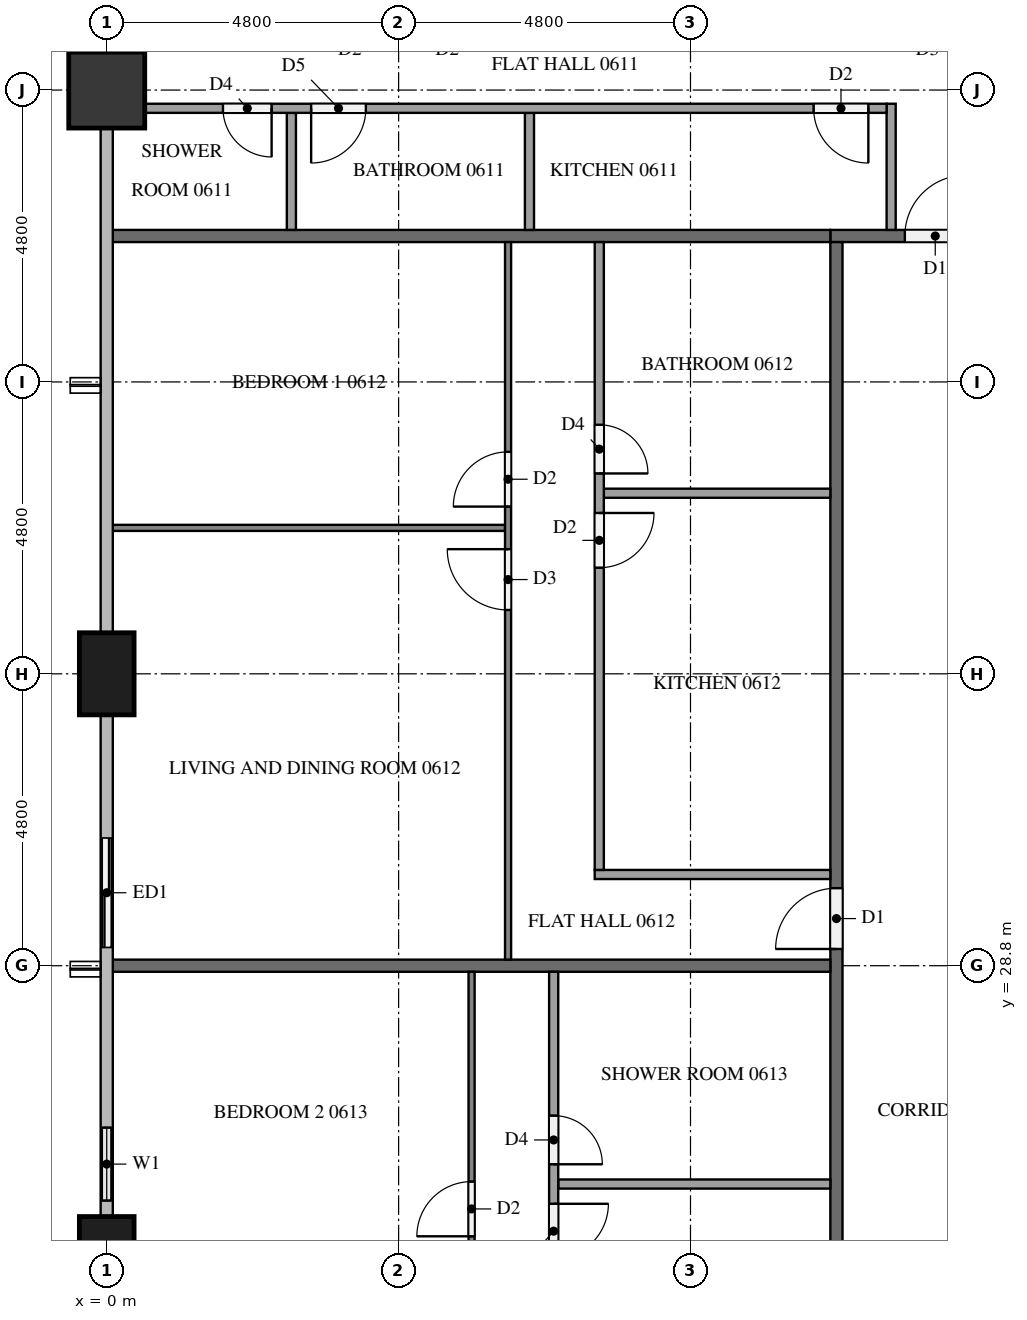
"""IFC4 building model, lengths in metres.
Left out: names, types, materials, properties, quantities, classifications, styles, units other than length and angle.
Written with IfcOpenShell. Run it as: python <this file> out.ifc"""

import sys

from ifc_helpers import new_model, si_unit, direction, frame, frame_2d, origin, origin_2d, place, context, subcontext, project, spatial, rectangle, extrude, element, fill, save


model = new_model("IFC4")
c1 = context("Model", 3, precision=1e-05, world=origin(), true_north=direction((0.0, 1.0)))
c2 = subcontext(c1, "Body", "Model", "MODEL_VIEW")
j1 = project(units=[si_unit("LENGTHUNIT", "METRE"), si_unit("PLANEANGLEUNIT", "RADIAN")], contexts=[c1])
p1 = place(None, origin())
s1 = spatial("IfcSite", under=j1, at=p1, CompositionType="ELEMENT")
p2 = place(p1, origin())
s2 = spatial("IfcBuilding", under=s1, at=p2, CompositionType="ELEMENT")
p3 = place(p2, frame((0.0, 0.0, 29.4)))
s3 = spatial("IfcBuildingStorey", under=s2, at=p3, CompositionType="ELEMENT", Elevation=29.4)
p4 = place(p3, frame((0.0, 43.2, 0.0), z_axis=(0.0, 0.0, 1.0), x_axis=(1.0, 0.0, 0.0)))
e1 = element("IfcColumn", 1, at=p4, inside=s3, PredefinedType="COLUMN", context=c2, shape_type="SweptSolid", body=[
    extrude(rectangle(XDim=1.25, YDim=1.25, at=origin_2d()), origin(), (0.0, 0.0, 1.0), 3.2),
])
for number, where, z_axis, x_axis in (
    (2, (0.0, 33.6, 0.0), (0.0, 0.0, 1.0), (0.0, 1.0, 0.0)),
    (3, (0.0, 24.0, 0.0), (0.0, 0.0, 1.0), (0.0, 1.0, 0.0)),
):
    element("IfcColumn", number, at=place(p3, frame(where, z_axis=z_axis, x_axis=x_axis)), inside=s3, PredefinedType="COLUMN", context=c2, shape_type="SweptSolid", body=[
        extrude(rectangle(XDim=1.35, YDim=0.9, at=origin_2d()), origin(), (0.0, 0.0, 1.0), 3.2),
    ])
p5 = place(p3, frame((0.0, 31.2, 0.0), z_axis=(0.0, 0.0, 1.0), x_axis=(0.0, -1.0, 0.0)))
e4 = element("IfcWall", 4, at=p5, inside=s3, PredefinedType="SOLIDWALL", context=c2, shape_type="SweptSolid", body=[
    extrude(rectangle(XDim=2.4, YDim=0.15, at=frame_2d((1.2, 0.0))), origin(), (0.0, 0.0, 1.0), 3.2),
])
p6 = place(p5, frame((0.3, 0.0, 0.0)))
e5 = element("IfcOpeningElement", 5, at=p6, cuts=e4, PredefinedType="OPENING", context=c2, shape_type="SweptSolid", body=[
    extrude(rectangle(XDim=1.8, YDim=2.4, at=frame_2d((0.9, 1.2))), frame((0.0, 0.085, 0.0), z_axis=(0.0, -1.0, 0.0), x_axis=(1.0, 0.0, 0.0)), (0.0, 0.0, 1.0), 0.17),
])
p7 = place(p3, frame((0.0, 26.4, 0.0), z_axis=(0.0, 0.0, 1.0), x_axis=(0.0, -1.0, 0.0)))
e6 = element("IfcWall", 6, at=p7, inside=s3, PredefinedType="SOLIDWALL", context=c2, shape_type="SweptSolid", body=[
    extrude(rectangle(XDim=1.725, YDim=0.15, at=frame_2d((0.862, 0.0))), origin(), (0.0, 0.0, 1.0), 3.2),
])
p8 = place(p7, frame((0.262, 0.0, 0.9)))
e7 = element("IfcOpeningElement", 7, at=p8, cuts=e6, PredefinedType="OPENING", context=c2, shape_type="SweptSolid", body=[
    extrude(rectangle(XDim=1.2, YDim=1.4, at=frame_2d((0.6, 0.7))), frame((0.0, 0.085, 0.0), z_axis=(0.0, -1.0, 0.0), x_axis=(1.0, 0.0, 0.0)), (0.0, 0.0, 1.0), 0.17),
])
p9 = place(p3, frame((11.9, 40.8, 0.0), z_axis=(0.0, 0.0, 1.0), x_axis=(1.0, 0.0, 0.0)))
e8 = element("IfcWall", 8, at=p9, inside=s3, PredefinedType="PARTITIONING", context=c2, shape_type="SweptSolid", body=[
    extrude(rectangle(XDim=38.6, YDim=0.2, at=frame_2d((19.3, 0.0))), origin(), (0.0, 0.0, 1.0), 3.2),
])
p10 = place(p9, frame((37.225, 0.0, 0.0)))
e9 = element("IfcOpeningElement", 9, at=p10, cuts=e8, PredefinedType="OPENING", context=c2, shape_type="SweptSolid", body=[
    extrude(rectangle(XDim=1.0, YDim=2.1, at=frame_2d((0.5, 1.05))), frame((0.0, 0.11, 0.0), z_axis=(0.0, -1.0, 0.0), x_axis=(1.0, 0.0, 0.0)), (0.0, 0.0, 1.0), 0.22),
])
p11 = place(p9, frame((30.025, 0.0, 0.0)))
e10 = element("IfcOpeningElement", 10, at=p11, cuts=e8, PredefinedType="OPENING", context=c2, shape_type="SweptSolid", body=[
    extrude(rectangle(XDim=1.0, YDim=2.1, at=frame_2d((0.5, 1.05))), frame((0.0, 0.11, 0.0), z_axis=(0.0, -1.0, 0.0), x_axis=(1.0, 0.0, 0.0)), (0.0, 0.0, 1.0), 0.22),
])
p12 = place(p9, frame((2.725, 0.0, 0.0)))
e11 = element("IfcOpeningElement", 11, at=p12, cuts=e8, PredefinedType="OPENING", context=c2, shape_type="SweptSolid", body=[
    extrude(rectangle(XDim=1.1, YDim=2.1, at=frame_2d((0.55, 1.05))), frame((0.0, 0.11, 0.0), z_axis=(0.0, -1.0, 0.0), x_axis=(1.0, 0.0, 0.0)), (0.0, 0.0, 1.0), 0.22),
])
p13 = place(p9, frame((1.225, 0.0, 0.0)))
e12 = element("IfcOpeningElement", 12, at=p13, cuts=e8, PredefinedType="OPENING", context=c2, shape_type="SweptSolid", body=[
    extrude(rectangle(XDim=1.0, YDim=2.1, at=frame_2d((0.5, 1.05))), frame((0.0, 0.11, 0.0), z_axis=(0.0, -1.0, 0.0), x_axis=(1.0, 0.0, 0.0)), (0.0, 0.0, 1.0), 0.22),
])
p14 = place(p3, frame((12.0, 12.1, 0.0), z_axis=(0.0, 0.0, 1.0), x_axis=(0.0, 1.0, 0.0)))
e13 = element("IfcWall", 13, at=p14, inside=s3, PredefinedType="PARTITIONING", context=c2, shape_type="SweptSolid", body=[
    extrude(rectangle(XDim=28.6, YDim=0.2, at=frame_2d((14.3, 0.0))), origin(), (0.0, 0.0, 1.0), 3.2),
])
p15 = place(p14, frame((16.975, 0.0, 0.0)))
e14 = element("IfcOpeningElement", 14, at=p15, cuts=e13, PredefinedType="OPENING", context=c2, shape_type="SweptSolid", body=[
    extrude(rectangle(XDim=1.0, YDim=2.1, at=frame_2d((0.5, 1.05))), frame((0.0, 0.11, 0.0), z_axis=(0.0, -1.0, 0.0), x_axis=(1.0, 0.0, 0.0)), (0.0, 0.0, 1.0), 0.22),
])
p16 = place(p14, frame((0.175, 0.0, 0.0)))
e15 = element("IfcOpeningElement", 15, at=p16, cuts=e13, PredefinedType="OPENING", context=c2, shape_type="SweptSolid", body=[
    extrude(rectangle(XDim=1.0, YDim=2.1, at=frame_2d((0.5, 1.05))), frame((0.0, 0.11, 0.0), z_axis=(0.0, -1.0, 0.0), x_axis=(1.0, 0.0, 0.0)), (0.0, 0.0, 1.0), 0.22),
])
for number, where, z_axis, x_axis in (
    (16, (0.1, 40.8, 0.0), (0.0, 0.0, 1.0), (1.0, 0.0, 0.0)),
    (17, (0.1, 28.8, 0.0), (0.0, 0.0, 1.0), (1.0, 0.0, 0.0)),
):
    element("IfcWall", number, at=place(p3, frame(where, z_axis=z_axis, x_axis=x_axis)), inside=s3, PredefinedType="PARTITIONING", context=c2, shape_type="SweptSolid", body=[
        extrude(rectangle(XDim=11.8, YDim=0.2, at=frame_2d((5.9, 0.0))), origin(), (0.0, 0.0, 1.0), 3.2),
    ])
for number, where, z_axis, x_axis in (
    (18, (6.952, 40.9, 0.0), (0.0, 0.0, 1.0), (0.0, 1.0, 0.0)),
    (19, (3.037, 40.9, 0.0), (0.0, 0.0, 1.0), (0.0, 1.0, 0.0)),
):
    element("IfcWall", number, at=place(p3, frame(where, z_axis=z_axis, x_axis=x_axis)), inside=s3, PredefinedType="PARTITIONING", context=c2, shape_type="SweptSolid", body=[
        extrude(rectangle(XDim=1.925, YDim=0.15, at=frame_2d((0.962, 0.0))), origin(), (0.0, 0.0, 1.0), 3.2),
    ])
p17 = place(p3, frame((12.9, 40.9, 0.0), z_axis=(0.0, 0.0, 1.0), x_axis=(0.0, 1.0, 0.0)))
e20 = element("IfcWall", 20, at=p17, inside=s3, PredefinedType="PARTITIONING", context=c2, shape_type="SweptSolid", body=[
    extrude(rectangle(XDim=2.075, YDim=0.15, at=frame_2d((1.038, 0.0))), origin(), (0.0, 0.0, 1.0), 3.2),
])
p18 = place(p3, frame((12.825, 42.9, 0.0), z_axis=(0.0, 0.0, 1.0), x_axis=(-1.0, 0.0, 0.0)))
e21 = element("IfcWall", 21, at=p18, inside=s3, PredefinedType="PARTITIONING", context=c2, shape_type="SweptSolid", body=[
    extrude(rectangle(XDim=12.2, YDim=0.15, at=frame_2d((6.1, 0.0))), origin(), (0.0, 0.0, 1.0), 3.2),
])
p19 = place(p18, frame((0.3, 0.0, 0.0)))
e22 = element("IfcOpeningElement", 22, at=p19, cuts=e21, PredefinedType="OPENING", context=c2, shape_type="SweptSolid", body=[
    extrude(rectangle(XDim=0.9, YDim=2.1, at=frame_2d((0.45, 1.05))), frame((0.0, 0.085, 0.0), z_axis=(0.0, -1.0, 0.0), x_axis=(1.0, 0.0, 0.0)), (0.0, 0.0, 1.0), 0.17),
])
p20 = place(p18, frame((8.563, 0.0, 0.0)))
e23 = element("IfcOpeningElement", 23, at=p20, cuts=e21, PredefinedType="OPENING", context=c2, shape_type="SweptSolid", body=[
    extrude(rectangle(XDim=0.9, YDim=2.1, at=frame_2d((0.45, 1.05))), frame((0.0, 0.085, 0.0), z_axis=(0.0, -1.0, 0.0), x_axis=(1.0, 0.0, 0.0)), (0.0, 0.0, 1.0), 0.17),
])
p21 = place(p18, frame((10.114, 0.0, 0.0)))
e24 = element("IfcOpeningElement", 24, at=p21, cuts=e21, PredefinedType="OPENING", context=c2, shape_type="SweptSolid", body=[
    extrude(rectangle(XDim=0.8, YDim=2.1, at=frame_2d((0.4, 1.05))), frame((0.0, 0.085, 0.0), z_axis=(0.0, -1.0, 0.0), x_axis=(1.0, 0.0, 0.0)), (0.0, 0.0, 1.0), 0.17),
])
p22 = place(p3, frame((6.55, 36.0, 0.0), z_axis=(0.0, 0.0, 1.0), x_axis=(-1.0, 0.0, 0.0)))
e25 = element("IfcWall", 25, at=p22, inside=s3, PredefinedType="PARTITIONING", context=c2, shape_type="SweptSolid", body=[
    extrude(rectangle(XDim=6.45, YDim=0.1, at=frame_2d((3.225, 0.0))), origin(), (0.0, 0.0, 1.0), 3.2),
])
p23 = place(p3, frame((6.6, 28.9, 0.0), z_axis=(0.0, 0.0, 1.0), x_axis=(0.0, 1.0, 0.0)))
e26 = element("IfcWall", 26, at=p23, inside=s3, PredefinedType="PARTITIONING", context=c2, shape_type="SweptSolid", body=[
    extrude(rectangle(XDim=11.8, YDim=0.1, at=frame_2d((5.9, 0.0))), origin(), (0.0, 0.0, 1.0), 3.2),
])
p24 = place(p23, frame((5.75, 0.0, 0.0)))
e27 = element("IfcOpeningElement", 27, at=p24, cuts=e26, PredefinedType="OPENING", context=c2, shape_type="SweptSolid", body=[
    extrude(rectangle(XDim=1.0, YDim=2.1, at=frame_2d((0.5, 1.05))), frame((0.0, 0.06, 0.0), z_axis=(0.0, -1.0, 0.0), x_axis=(1.0, 0.0, 0.0)), (0.0, 0.0, 1.0), 0.12),
])
p25 = place(p23, frame((7.45, 0.0, 0.0)))
e28 = element("IfcOpeningElement", 28, at=p25, cuts=e26, PredefinedType="OPENING", context=c2, shape_type="SweptSolid", body=[
    extrude(rectangle(XDim=0.9, YDim=2.1, at=frame_2d((0.45, 1.05))), frame((0.0, 0.06, 0.0), z_axis=(0.0, -1.0, 0.0), x_axis=(1.0, 0.0, 0.0)), (0.0, 0.0, 1.0), 0.12),
])
p26 = place(p3, frame((11.9, 36.57, 0.0), z_axis=(0.0, 0.0, 1.0), x_axis=(-1.0, 0.0, 0.0)))
e29 = element("IfcWall", 29, at=p26, inside=s3, PredefinedType="PARTITIONING", context=c2, shape_type="SweptSolid", body=[
    extrude(rectangle(XDim=3.725, YDim=0.15, at=frame_2d((1.862, 0.0))), origin(), (0.0, 0.0, 1.0), 3.2),
])
p27 = place(p3, frame((11.9, 30.3, 0.0), z_axis=(0.0, 0.0, 1.0), x_axis=(-1.0, 0.0, 0.0)))
e30 = element("IfcWall", 30, at=p27, inside=s3, PredefinedType="PARTITIONING", context=c2, shape_type="SweptSolid", body=[
    extrude(rectangle(XDim=3.875, YDim=0.15, at=frame_2d((1.938, 0.0))), origin(), (0.0, 0.0, 1.0), 3.2),
])
p28 = place(p3, frame((8.1, 40.7, 0.0), z_axis=(0.0, 0.0, 1.0), x_axis=(0.0, -1.0, 0.0)))
e31 = element("IfcWall", 31, at=p28, inside=s3, PredefinedType="PARTITIONING", context=c2, shape_type="SweptSolid", body=[
    extrude(rectangle(XDim=10.325, YDim=0.15, at=frame_2d((5.163, 0.0))), origin(), (0.0, 0.0, 1.0), 3.2),
])
p29 = place(p28, frame((4.455, 0.0, 0.0)))
e32 = element("IfcOpeningElement", 32, at=p29, cuts=e31, PredefinedType="OPENING", context=c2, shape_type="SweptSolid", body=[
    extrude(rectangle(XDim=0.9, YDim=2.1, at=frame_2d((0.45, 1.05))), frame((0.0, 0.085, 0.0), z_axis=(0.0, -1.0, 0.0), x_axis=(1.0, 0.0, 0.0)), (0.0, 0.0, 1.0), 0.17),
])
p30 = place(p28, frame((3.005, 0.0, 0.0)))
e33 = element("IfcOpeningElement", 33, at=p30, cuts=e31, PredefinedType="OPENING", context=c2, shape_type="SweptSolid", body=[
    extrude(rectangle(XDim=0.8, YDim=2.1, at=frame_2d((0.4, 1.05))), frame((0.0, 0.085, 0.0), z_axis=(0.0, -1.0, 0.0), x_axis=(1.0, 0.0, 0.0)), (0.0, 0.0, 1.0), 0.17),
])
p31 = place(p3, frame((6.0, 12.1, 0.0), z_axis=(0.0, 0.0, 1.0), x_axis=(0.0, 1.0, 0.0)))
e34 = element("IfcWall", 34, at=p31, inside=s3, PredefinedType="PARTITIONING", context=c2, shape_type="SweptSolid", body=[
    extrude(rectangle(XDim=16.6, YDim=0.1, at=frame_2d((8.3, 0.0))), origin(), (0.0, 0.0, 1.0), 3.2),
])
p32 = place(p31, frame((0.3, 0.0, 0.0)))
e35 = element("IfcOpeningElement", 35, at=p32, cuts=e34, PredefinedType="OPENING", context=c2, shape_type="SweptSolid", body=[
    extrude(rectangle(XDim=1.0, YDim=2.1, at=frame_2d((0.5, 1.05))), frame((0.0, 0.06, 0.0), z_axis=(0.0, -1.0, 0.0), x_axis=(1.0, 0.0, 0.0)), (0.0, 0.0, 1.0), 0.12),
])
p33 = place(p31, frame((10.65, 0.0, 0.0)))
e36 = element("IfcOpeningElement", 36, at=p33, cuts=e34, PredefinedType="OPENING", context=c2, shape_type="SweptSolid", body=[
    extrude(rectangle(XDim=0.9, YDim=2.1, at=frame_2d((0.45, 1.05))), frame((0.0, 0.06, 0.0), z_axis=(0.0, -1.0, 0.0), x_axis=(1.0, 0.0, 0.0)), (0.0, 0.0, 1.0), 0.12),
])
p34 = place(p31, frame((12.25, 0.0, 0.0)))
e37 = element("IfcOpeningElement", 37, at=p34, cuts=e34, PredefinedType="OPENING", context=c2, shape_type="SweptSolid", body=[
    extrude(rectangle(XDim=0.9, YDim=2.1, at=frame_2d((0.45, 1.05))), frame((0.0, 0.06, 0.0), z_axis=(0.0, -1.0, 0.0), x_axis=(1.0, 0.0, 0.0)), (0.0, 0.0, 1.0), 0.12),
])
p35 = place(p3, frame((11.9, 25.21, 0.0), z_axis=(0.0, 0.0, 1.0), x_axis=(-1.0, 0.0, 0.0)))
e38 = element("IfcWall", 38, at=p35, inside=s3, PredefinedType="PARTITIONING", context=c2, shape_type="SweptSolid", body=[
    extrude(rectangle(XDim=4.475, YDim=0.15, at=frame_2d((2.237, 0.0))), origin(), (0.0, 0.0, 1.0), 3.2),
])
p36 = place(p3, frame((7.35, 28.7, 0.0), z_axis=(0.0, 0.0, 1.0), x_axis=(0.0, -1.0, 0.0)))
e39 = element("IfcWall", 39, at=p36, inside=s3, PredefinedType="PARTITIONING", context=c2, shape_type="SweptSolid", body=[
    extrude(rectangle(XDim=15.125, YDim=0.15, at=frame_2d((7.562, 0.0))), origin(), (0.0, 0.0, 1.0), 3.2),
])
p37 = place(p36, frame((13.925, 0.0, 0.0)))
e40 = element("IfcOpeningElement", 40, at=p37, cuts=e39, PredefinedType="OPENING", context=c2, shape_type="SweptSolid", body=[
    extrude(rectangle(XDim=0.9, YDim=2.1, at=frame_2d((0.45, 1.05))), frame((0.0, 0.085, 0.0), z_axis=(0.0, -1.0, 0.0), x_axis=(1.0, 0.0, 0.0)), (0.0, 0.0, 1.0), 0.17),
])
p38 = place(p36, frame((3.815, 0.0, 0.0)))
e41 = element("IfcOpeningElement", 41, at=p38, cuts=e39, PredefinedType="OPENING", context=c2, shape_type="SweptSolid", body=[
    extrude(rectangle(XDim=0.9, YDim=2.1, at=frame_2d((0.45, 1.05))), frame((0.0, 0.085, 0.0), z_axis=(0.0, -1.0, 0.0), x_axis=(1.0, 0.0, 0.0)), (0.0, 0.0, 1.0), 0.17),
])
p39 = place(p36, frame((2.365, 0.0, 0.0)))
e42 = element("IfcOpeningElement", 42, at=p39, cuts=e39, PredefinedType="OPENING", context=c2, shape_type="SweptSolid", body=[
    extrude(rectangle(XDim=0.8, YDim=2.1, at=frame_2d((0.4, 1.05))), frame((0.0, 0.085, 0.0), z_axis=(0.0, -1.0, 0.0), x_axis=(1.0, 0.0, 0.0)), (0.0, 0.0, 1.0), 0.17),
])
p40 = place(p6, origin())
e43 = element("IfcDoor", 43, at=p40, inside=s3, OperationType="SLIDING_TO_RIGHT", PredefinedType="DOOR", context=c2, shape_type="SweptSolid", body=[
    extrude(rectangle(XDim=1.8, YDim=2.4, at=frame_2d((0.9, 1.2))), frame((0.0, 0.025, 0.0), z_axis=(0.0, -1.0, 0.0), x_axis=(1.0, 0.0, 0.0)), (0.0, 0.0, 1.0), 0.05),
])
fill(e5, e43)
p41 = place(p8, origin())
e44 = element("IfcWindow", 44, at=p41, inside=s3, PartitioningType="SINGLE_PANEL", PredefinedType="WINDOW", context=c2, shape_type="SweptSolid", body=[
    extrude(rectangle(XDim=1.2, YDim=1.4, at=frame_2d((0.6, 0.7))), frame((0.0, 0.03, 0.0), z_axis=(0.0, -1.0, 0.0), x_axis=(1.0, 0.0, 0.0)), (0.0, 0.0, 1.0), 0.06),
])
fill(e7, e44)
p42 = place(p13, origin())
e45 = element("IfcDoor", 45, at=p42, inside=s3, OperationType="SINGLE_SWING_RIGHT", PredefinedType="DOOR", context=c2, shape_type="SweptSolid", body=[
    extrude(rectangle(XDim=1.0, YDim=2.1, at=frame_2d((0.5, 1.05))), frame((0.0, 0.025, 0.0), z_axis=(0.0, -1.0, 0.0), x_axis=(1.0, 0.0, 0.0)), (0.0, 0.0, 1.0), 0.05),
])
fill(e12, e45)
p43 = place(p15, origin())
e46 = element("IfcDoor", 46, at=p43, inside=s3, OperationType="SINGLE_SWING_LEFT", PredefinedType="DOOR", context=c2, shape_type="SweptSolid", body=[
    extrude(rectangle(XDim=1.0, YDim=2.1, at=frame_2d((0.5, 1.05))), frame((0.0, 0.025, 0.0), z_axis=(0.0, -1.0, 0.0), x_axis=(1.0, 0.0, 0.0)), (0.0, 0.0, 1.0), 0.05),
])
fill(e14, e46)
p44 = place(p19, origin())
e47 = element("IfcDoor", 47, at=p44, inside=s3, OperationType="SINGLE_SWING_LEFT", PredefinedType="DOOR", context=c2, shape_type="SweptSolid", body=[
    extrude(rectangle(XDim=0.9, YDim=2.1, at=frame_2d((0.45, 1.05))), frame((0.0, 0.025, 0.0), z_axis=(0.0, -1.0, 0.0), x_axis=(1.0, 0.0, 0.0)), (0.0, 0.0, 1.0), 0.05),
])
fill(e22, e47)
p45 = place(p20, origin())
e48 = element("IfcDoor", 48, at=p45, inside=s3, OperationType="SINGLE_SWING_RIGHT", PredefinedType="DOOR", context=c2, shape_type="SweptSolid", body=[
    extrude(rectangle(XDim=0.9, YDim=2.1, at=frame_2d((0.45, 1.05))), frame((0.0, 0.025, 0.0), z_axis=(0.0, -1.0, 0.0), x_axis=(1.0, 0.0, 0.0)), (0.0, 0.0, 1.0), 0.05),
])
fill(e23, e48)
p46 = place(p21, origin())
e49 = element("IfcDoor", 49, at=p46, inside=s3, OperationType="SINGLE_SWING_LEFT", PredefinedType="DOOR", context=c2, shape_type="SweptSolid", body=[
    extrude(rectangle(XDim=0.8, YDim=2.1, at=frame_2d((0.4, 1.05))), frame((0.0, 0.025, 0.0), z_axis=(0.0, -1.0, 0.0), x_axis=(1.0, 0.0, 0.0)), (0.0, 0.0, 1.0), 0.05),
])
fill(e24, e49)
p47 = place(p24, origin())
e50 = element("IfcDoor", 50, at=p47, inside=s3, OperationType="SINGLE_SWING_RIGHT", PredefinedType="DOOR", context=c2, shape_type="SweptSolid", body=[
    extrude(rectangle(XDim=1.0, YDim=2.1, at=frame_2d((0.5, 1.05))), frame((0.0, 0.025, 0.0), z_axis=(0.0, -1.0, 0.0), x_axis=(1.0, 0.0, 0.0)), (0.0, 0.0, 1.0), 0.05),
])
fill(e27, e50)
p48 = place(p25, origin())
e51 = element("IfcDoor", 51, at=p48, inside=s3, OperationType="SINGLE_SWING_LEFT", PredefinedType="DOOR", context=c2, shape_type="SweptSolid", body=[
    extrude(rectangle(XDim=0.9, YDim=2.1, at=frame_2d((0.45, 1.05))), frame((0.0, 0.025, 0.0), z_axis=(0.0, -1.0, 0.0), x_axis=(1.0, 0.0, 0.0)), (0.0, 0.0, 1.0), 0.05),
])
fill(e28, e51)
p49 = place(p29, origin())
e52 = element("IfcDoor", 52, at=p49, inside=s3, OperationType="SINGLE_SWING_LEFT", PredefinedType="DOOR", context=c2, shape_type="SweptSolid", body=[
    extrude(rectangle(XDim=0.9, YDim=2.1, at=frame_2d((0.45, 1.05))), frame((0.0, 0.025, 0.0), z_axis=(0.0, -1.0, 0.0), x_axis=(1.0, 0.0, 0.0)), (0.0, 0.0, 1.0), 0.05),
])
fill(e32, e52)
p50 = place(p30, origin())
e53 = element("IfcDoor", 53, at=p50, inside=s3, OperationType="SINGLE_SWING_RIGHT", PredefinedType="DOOR", context=c2, shape_type="SweptSolid", body=[
    extrude(rectangle(XDim=0.8, YDim=2.1, at=frame_2d((0.4, 1.05))), frame((0.0, 0.025, 0.0), z_axis=(0.0, -1.0, 0.0), x_axis=(1.0, 0.0, 0.0)), (0.0, 0.0, 1.0), 0.05),
])
fill(e33, e53)
p51 = place(p34, origin())
e54 = element("IfcDoor", 54, at=p51, inside=s3, OperationType="SINGLE_SWING_LEFT", PredefinedType="DOOR", context=c2, shape_type="SweptSolid", body=[
    extrude(rectangle(XDim=0.9, YDim=2.1, at=frame_2d((0.45, 1.05))), frame((0.0, 0.025, 0.0), z_axis=(0.0, -1.0, 0.0), x_axis=(1.0, 0.0, 0.0)), (0.0, 0.0, 1.0), 0.05),
])
fill(e37, e54)
p52 = place(p38, origin())
e55 = element("IfcDoor", 55, at=p52, inside=s3, OperationType="SINGLE_SWING_LEFT", PredefinedType="DOOR", context=c2, shape_type="SweptSolid", body=[
    extrude(rectangle(XDim=0.9, YDim=2.1, at=frame_2d((0.45, 1.05))), frame((0.0, 0.025, 0.0), z_axis=(0.0, -1.0, 0.0), x_axis=(1.0, 0.0, 0.0)), (0.0, 0.0, 1.0), 0.05),
])
fill(e41, e55)
p53 = place(p39, origin())
e56 = element("IfcDoor", 56, at=p53, inside=s3, OperationType="SINGLE_SWING_RIGHT", PredefinedType="DOOR", context=c2, shape_type="SweptSolid", body=[
    extrude(rectangle(XDim=0.8, YDim=2.1, at=frame_2d((0.4, 1.05))), frame((0.0, 0.025, 0.0), z_axis=(0.0, -1.0, 0.0), x_axis=(1.0, 0.0, 0.0)), (0.0, 0.0, 1.0), 0.05),
])
fill(e42, e56)
save(model, sys.argv[1])
